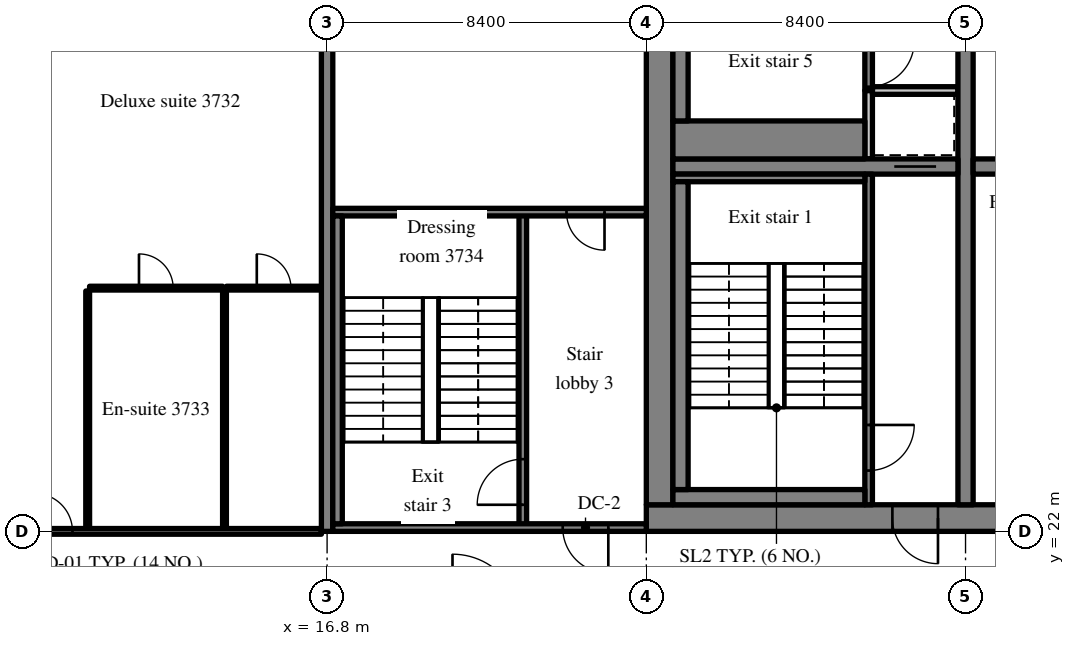
"""IFC4 building model, lengths in metres.
Left out: names, types, materials, properties, quantities, classifications, styles, units other than length and angle.
Written with IfcOpenShell. Run it as: python <this file> out.ifc"""

import sys

from ifc_helpers import new_model, si_unit, direction, frame, frame_2d, origin, place, context, subcontext, project, spatial, rectangle, extrude, source, transform, mapped, element, fill, save


model = new_model("IFC4")
c1 = context("Model", 3, precision=1e-05, world=origin(), true_north=direction((0.0, 1.0)))
c2 = subcontext(c1, "Body", "Model", "MODEL_VIEW")
j1 = project(units=[si_unit("LENGTHUNIT", "METRE"), si_unit("PLANEANGLEUNIT", "RADIAN")], contexts=[c1])
p1 = place(None, origin())
s1 = spatial("IfcSite", under=j1, at=p1, CompositionType="ELEMENT")
p2 = place(p1, origin())
s2 = spatial("IfcBuilding", under=s1, at=p2, CompositionType="ELEMENT")
p3 = place(p2, frame((0.0, 0.0, 155.4)))
s3 = spatial("IfcBuildingStorey", under=s2, at=p3, CompositionType="ELEMENT", Elevation=155.4)
m1 = source(origin(), c2, "Body", "SweptSolid", [
    extrude(rectangle(XDim=50.4, YDim=0.7, at=frame_2d((25.2, 0.0))), origin(), (0.0, 0.0, 1.0), 3.52),
])
p4 = place(p3, frame((25.2, 22.35, 0.0), z_axis=(0.0, 0.0, 1.0), x_axis=(1.0, 0.0, 0.0)))
e1 = element("IfcWall", 1, at=p4, inside=s3, PredefinedType="SHEAR", context=c2, shape_type="MappedRepresentation", body=[
    mapped(m1, transform((0.0, 0.0, 0.0), scale=1.0)),
])
m2 = source(origin(), c2, "Body", "SweptSolid", [
    extrude(rectangle(XDim=1.8, YDim=2.1, at=frame_2d((0.9, 1.05))), frame((0.0, 0.36, 0.0), z_axis=(0.0, -1.0, 0.0), x_axis=(1.0, 0.0, 0.0)), (0.0, 0.0, 1.0), 0.72),
])
p5 = place(p4, frame((15.9, 0.0, 0.0)))
e2 = element("IfcOpeningElement", 2, at=p5, cuts=e1, PredefinedType="OPENING", context=c2, shape_type="MappedRepresentation", body=[
    mapped(m2, transform((0.0, 0.0, 0.0), scale=1.0)),
])
m3 = source(origin(), c2, "Body", "SweptSolid", [
    extrude(rectangle(XDim=0.9, YDim=2.1, at=frame_2d((0.45, 1.05))), frame((0.0, 0.36, 0.0), z_axis=(0.0, -1.0, 0.0), x_axis=(1.0, 0.0, 0.0)), (0.0, 0.0, 1.0), 0.72),
])
p6 = place(p4, frame((21.5, 0.0, 0.0)))
e3 = element("IfcOpeningElement", 3, at=p6, cuts=e1, PredefinedType="OPENING", context=c2, shape_type="MappedRepresentation", body=[
    mapped(m3, transform((0.0, 0.0, 0.0), scale=1.0)),
])
p7 = place(p4, frame((32.7, 0.0, 0.0)))
e4 = element("IfcOpeningElement", 4, at=p7, cuts=e1, PredefinedType="OPENING", context=c2, shape_type="MappedRepresentation", body=[
    mapped(m2, transform((0.0, 0.0, 0.0), scale=1.0)),
])
m4 = source(origin(), c2, "Body", "SweptSolid", [
    extrude(rectangle(XDim=1.2, YDim=2.1, at=frame_2d((0.6, 1.05))), frame((0.0, 0.36, 0.0), z_axis=(0.0, -1.0, 0.0), x_axis=(1.0, 0.0, 0.0)), (0.0, 0.0, 1.0), 0.72),
])
p8 = place(p4, frame((6.475, 0.0, 0.0)))
e5 = element("IfcOpeningElement", 5, at=p8, cuts=e1, PredefinedType="OPENING", context=c2, shape_type="MappedRepresentation", body=[
    mapped(m4, transform((0.0, 0.0, 0.0), scale=1.0)),
])
p9 = place(p4, frame((47.875, 0.0, 0.0)))
e6 = element("IfcOpeningElement", 6, at=p9, cuts=e1, PredefinedType="OPENING", context=c2, shape_type="MappedRepresentation", body=[
    mapped(m4, transform((0.0, 0.0, 0.0), scale=1.0)),
])
m5 = source(origin(), c2, "Body", "SweptSolid", [
    extrude(rectangle(XDim=18.6, YDim=0.7, at=frame_2d((9.3, 0.0))), origin(), (0.0, 0.0, 1.0), 3.52),
])
p10 = place(p3, frame((25.55, 22.7, 0.0), z_axis=(0.0, 0.0, 1.0), x_axis=(0.0, 1.0, 0.0)))
e7 = element("IfcWall", 7, at=p10, inside=s3, PredefinedType="SHEAR", context=c2, shape_type="MappedRepresentation", body=[
    mapped(m5, transform((0.0, 0.0, 0.0), scale=1.0)),
])
m6 = source(origin(), c2, "Body", "SweptSolid", [
    extrude(rectangle(XDim=18.6, YDim=0.4, at=frame_2d((9.3, 0.0))), origin(), (0.0, 0.0, 1.0), 3.52),
])
p11 = place(p3, frame((33.6, 22.7, 0.0), z_axis=(0.0, 0.0, 1.0), x_axis=(0.0, 1.0, 0.0)))
e8 = element("IfcWall", 8, at=p11, inside=s3, PredefinedType="SHEAR", context=c2, shape_type="MappedRepresentation", body=[
    mapped(m6, transform((0.0, 0.0, 0.0), scale=1.0)),
])
m7 = source(origin(), c2, "Body", "SweptSolid", [
    extrude(rectangle(XDim=1.1, YDim=2.1, at=frame_2d((0.55, 1.05))), frame((0.0, 0.21, 0.0), z_axis=(0.0, -1.0, 0.0), x_axis=(1.0, 0.0, 0.0)), (0.0, 0.0, 1.0), 0.42),
])
p12 = place(p11, frame((12.75, 0.0, 0.0)))
e9 = element("IfcOpeningElement", 9, at=p12, cuts=e8, PredefinedType="OPENING", context=c2, shape_type="MappedRepresentation", body=[
    mapped(m7, transform((0.0, 0.0, 0.0), scale=1.0)),
])
m8 = source(origin(), c2, "Body", "SweptSolid", [
    extrude(rectangle(XDim=7.5, YDim=0.4, at=frame_2d((3.75, 0.0))), origin(), (0.0, 0.0, 1.0), 3.52),
])
p13 = place(p3, frame((25.9, 31.6, 0.0), z_axis=(0.0, 0.0, 1.0), x_axis=(1.0, 0.0, 0.0)))
e10 = element("IfcWall", 10, at=p13, inside=s3, PredefinedType="SHEAR", context=c2, shape_type="MappedRepresentation", body=[
    mapped(m8, transform((0.0, 0.0, 0.0), scale=1.0)),
])
p14 = place(p13, frame((5.825, 0.0, 0.0)))
e11 = element("IfcOpeningElement", 11, at=p14, cuts=e10, PredefinedType="OPENING", context=c2, shape_type="MappedRepresentation", body=[
    mapped(m7, transform((0.0, 0.0, 0.0), scale=1.0)),
])
m9 = source(origin(), c2, "Body", "SweptSolid", [
    extrude(rectangle(XDim=16.4, YDim=0.4, at=frame_2d((8.2, 0.0))), origin(), (0.0, 0.0, 1.0), 3.52),
])
p15 = place(p3, frame((33.8, 31.6, 0.0), z_axis=(0.0, 0.0, 1.0), x_axis=(1.0, 0.0, 0.0)))
e12 = element("IfcWall", 12, at=p15, inside=s3, PredefinedType="SHEAR", context=c2, shape_type="MappedRepresentation", body=[
    mapped(m9, transform((0.0, 0.0, 0.0), scale=1.0)),
])
m10 = source(origin(), c2, "Body", "SweptSolid", [
    extrude(rectangle(XDim=1.0, YDim=2.1, at=frame_2d((0.5, 1.05))), frame((0.0, 0.21, 0.0), z_axis=(0.0, -1.0, 0.0), x_axis=(1.0, 0.0, 0.0)), (0.0, 0.0, 1.0), 0.42),
])
p16 = place(p15, frame((14.8, 0.0, 0.0)))
e13 = element("IfcOpeningElement", 13, at=p16, cuts=e12, PredefinedType="OPENING", context=c2, shape_type="MappedRepresentation", body=[
    mapped(m10, transform((0.0, 0.0, 0.0), scale=1.0)),
])
m11 = source(origin(), c2, "Body", "SweptSolid", [
    extrude(rectangle(XDim=20.0, YDim=0.3, at=frame_2d((10.0, 0.0))), origin(), (0.0, 0.0, 1.0), 3.52),
])
p17 = place(p3, frame((16.8, 22.0, 0.0), z_axis=(0.0, 0.0, 1.0), x_axis=(0.0, 1.0, 0.0)))
e14 = element("IfcWall", 14, at=p17, inside=s3, PredefinedType="SHEAR", context=c2, shape_type="MappedRepresentation", body=[
    mapped(m11, transform((0.0, 0.0, 0.0), scale=1.0)),
])
m12 = source(origin(), c2, "Body", "SweptSolid", [
    extrude(rectangle(XDim=8.7, YDim=0.2, at=frame_2d((4.35, 0.0))), origin(), (0.0, 0.0, 1.0), 3.52),
])
p18 = place(p3, frame((31.05, 22.7, 0.0), z_axis=(0.0, 0.0, 1.0), x_axis=(0.0, 1.0, 0.0)))
e15 = element("IfcWall", 15, at=p18, inside=s3, PredefinedType="SOLIDWALL", context=c2, shape_type="MappedRepresentation", body=[
    mapped(m12, transform((0.0, 0.0, 0.0), scale=1.0)),
])
m13 = source(origin(), c2, "Body", "SweptSolid", [
    extrude(rectangle(XDim=1.2, YDim=2.1, at=frame_2d((0.6, 1.05))), frame((0.0, 0.11, 0.0), z_axis=(0.0, -1.0, 0.0), x_axis=(1.0, 0.0, 0.0)), (0.0, 0.0, 1.0), 0.22),
])
p19 = place(p18, frame((0.9, 0.0, 0.0)))
e16 = element("IfcOpeningElement", 16, at=p19, cuts=e15, PredefinedType="OPENING", context=c2, shape_type="MappedRepresentation", body=[
    mapped(m13, transform((0.0, 0.0, 0.0), scale=1.0)),
])
m14 = source(origin(), c2, "Body", "SweptSolid", [
    extrude(rectangle(XDim=1.8, YDim=0.2, at=frame_2d((0.9, 0.0))), origin(), (0.0, 0.0, 1.0), 3.52),
])
p20 = place(p3, frame((31.05, 31.8, 0.0), z_axis=(0.0, 0.0, 1.0), x_axis=(0.0, 1.0, 0.0)))
e17 = element("IfcWall", 17, at=p20, inside=s3, PredefinedType="SOLIDWALL", context=c2, shape_type="MappedRepresentation", body=[
    mapped(m14, transform((0.0, 0.0, 0.0), scale=1.0)),
])
m15 = source(origin(), c2, "Body", "SweptSolid", [
    extrude(rectangle(XDim=2.25, YDim=0.2, at=frame_2d((1.125, 0.0))), origin(), (0.0, 0.0, 1.0), 3.52),
])
p21 = place(p3, frame((31.15, 33.6, 0.0), z_axis=(0.0, 0.0, 1.0), x_axis=(1.0, 0.0, 0.0)))
e18 = element("IfcWall", 18, at=p21, inside=s3, PredefinedType="SOLIDWALL", context=c2, shape_type="MappedRepresentation", body=[
    mapped(m15, transform((0.0, 0.0, 0.0), scale=1.0)),
])
m16 = source(origin(), c2, "Body", "SweptSolid", [
    extrude(rectangle(XDim=7.7, YDim=0.2, at=frame_2d((3.85, 0.0))), origin(), (0.0, 0.0, 1.0), 3.52),
])
p22 = place(p3, frame((31.05, 33.6, 0.0), z_axis=(0.0, 0.0, 1.0), x_axis=(0.0, 1.0, 0.0)))
e19 = element("IfcWall", 19, at=p22, inside=s3, PredefinedType="SOLIDWALL", context=c2, shape_type="MappedRepresentation", body=[
    mapped(m16, transform((0.0, 0.0, 0.0), scale=1.0)),
])
p23 = place(p22, frame((0.1, 0.0, 0.0)))
e20 = element("IfcOpeningElement", 20, at=p23, cuts=e19, PredefinedType="OPENING", context=c2, shape_type="MappedRepresentation", body=[
    mapped(m13, transform((0.0, 0.0, 0.0), scale=1.0)),
])
m17 = source(origin(), c2, "Body", "SweptSolid", [
    extrude(rectangle(XDim=8.3, YDim=0.2, at=frame_2d((4.15, 0.0))), origin(), (0.0, 0.0, 1.0), 3.52),
])
p24 = place(p3, frame((21.95, 22.1, 0.0), z_axis=(0.0, 0.0, 1.0), x_axis=(0.0, 1.0, 0.0)))
e21 = element("IfcWall", 21, at=p24, inside=s3, PredefinedType="SOLIDWALL", context=c2, shape_type="MappedRepresentation", body=[
    mapped(m17, transform((0.0, 0.0, 0.0), scale=1.0)),
])
p25 = place(p24, frame((0.6, 0.0, 0.0)))
e22 = element("IfcOpeningElement", 22, at=p25, cuts=e21, PredefinedType="OPENING", context=c2, shape_type="MappedRepresentation", body=[
    mapped(m13, transform((0.0, 0.0, 0.0), scale=1.0)),
])
m18 = source(origin(), c2, "Body", "SweptSolid", [
    extrude(rectangle(XDim=8.25, YDim=0.2, at=frame_2d((4.125, 0.0))), origin(), (0.0, 0.0, 1.0), 3.52),
])
p26 = place(p3, frame((16.95, 22.1, 0.0), z_axis=(0.0, 0.0, 1.0), x_axis=(1.0, 0.0, 0.0)))
e23 = element("IfcWall", 23, at=p26, inside=s3, PredefinedType="SOLIDWALL", context=c2, shape_type="MappedRepresentation", body=[
    mapped(m18, transform((0.0, 0.0, 0.0), scale=1.0)),
])
p27 = place(p26, frame((6.05, 0.0, 0.0)))
e24 = element("IfcOpeningElement", 24, at=p27, cuts=e23, PredefinedType="OPENING", context=c2, shape_type="MappedRepresentation", body=[
    mapped(m13, transform((0.0, 0.0, 0.0), scale=1.0)),
])
p28 = place(p3, frame((16.95, 30.4, 0.0), z_axis=(0.0, 0.0, 1.0), x_axis=(1.0, 0.0, 0.0)))
e25 = element("IfcWall", 25, at=p28, inside=s3, PredefinedType="SOLIDWALL", context=c2, shape_type="MappedRepresentation", body=[
    mapped(m18, transform((0.0, 0.0, 0.0), scale=1.0)),
])
m19 = source(origin(), c2, "Body", "SweptSolid", [
    extrude(rectangle(XDim=1.0, YDim=2.1, at=frame_2d((0.5, 1.05))), frame((0.0, 0.11, 0.0), z_axis=(0.0, -1.0, 0.0), x_axis=(1.0, 0.0, 0.0)), (0.0, 0.0, 1.0), 0.22),
])
p29 = place(p28, frame((6.15, 0.0, 0.0)))
e26 = element("IfcOpeningElement", 26, at=p29, cuts=e25, PredefinedType="OPENING", context=c2, shape_type="MappedRepresentation", body=[
    mapped(m19, transform((0.0, 0.0, 0.0), scale=1.0)),
])
m20 = source(origin(), c2, "Body", "SweptSolid", [
    extrude(rectangle(XDim=5.05, YDim=0.4, at=frame_2d((2.525, 0.0))), origin(), (0.0, 0.0, 1.0), 3.52),
])
p30 = place(p3, frame((25.9, 22.9, 0.0), z_axis=(0.0, 0.0, 1.0), x_axis=(1.0, 0.0, 0.0)))
e27 = element("IfcWall", 27, at=p30, inside=s3, PredefinedType="SOLIDWALL", context=c2, shape_type="MappedRepresentation", body=[
    mapped(m20, transform((0.0, 0.0, 0.0), scale=1.0)),
])
m21 = source(origin(), c2, "Body", "SweptSolid", [
    extrude(rectangle(XDim=5.05, YDim=0.2, at=frame_2d((2.525, 0.0))), origin(), (0.0, 0.0, 1.0), 3.52),
])
p31 = place(p3, frame((25.9, 31.3, 0.0), z_axis=(0.0, 0.0, 1.0), x_axis=(1.0, 0.0, 0.0)))
e28 = element("IfcWall", 28, at=p31, inside=s3, PredefinedType="SOLIDWALL", context=c2, shape_type="MappedRepresentation", body=[
    mapped(m21, transform((0.0, 0.0, 0.0), scale=1.0)),
])
m22 = source(origin(), c2, "Body", "SweptSolid", [
    extrude(rectangle(XDim=8.1, YDim=0.4, at=frame_2d((4.05, 0.0))), origin(), (0.0, 0.0, 1.0), 3.52),
])
p32 = place(p3, frame((26.1, 23.1, 0.0), z_axis=(0.0, 0.0, 1.0), x_axis=(0.0, 1.0, 0.0)))
e29 = element("IfcWall", 29, at=p32, inside=s3, PredefinedType="SOLIDWALL", context=c2, shape_type="MappedRepresentation", body=[
    mapped(m22, transform((0.0, 0.0, 0.0), scale=1.0)),
])
m23 = source(origin(), c2, "Body", "SweptSolid", [
    extrude(rectangle(XDim=8.1, YDim=0.25, at=frame_2d((4.05, 0.0))), origin(), (0.0, 0.0, 1.0), 3.52),
])
p33 = place(p3, frame((17.075, 22.2, 0.0), z_axis=(0.0, 0.0, 1.0), x_axis=(0.0, 1.0, 0.0)))
e30 = element("IfcWall", 30, at=p33, inside=s3, PredefinedType="SOLIDWALL", context=c2, shape_type="MappedRepresentation", body=[
    mapped(m23, transform((0.0, 0.0, 0.0), scale=1.0)),
])
m24 = source(origin(), c2, "Body", "SweptSolid", [
    extrude(rectangle(XDim=5.05, YDim=1.0, at=frame_2d((2.525, 0.0))), origin(), (0.0, 0.0, 1.0), 3.52),
])
p34 = place(p3, frame((25.9, 32.3, 0.0), z_axis=(0.0, 0.0, 1.0), x_axis=(1.0, 0.0, 0.0)))
e31 = element("IfcWall", 31, at=p34, inside=s3, PredefinedType="SOLIDWALL", context=c2, shape_type="MappedRepresentation", body=[
    mapped(m24, transform((0.0, 0.0, 0.0), scale=1.0)),
])
p35 = place(p3, frame((26.1, 32.8, 0.0), z_axis=(0.0, 0.0, 1.0), x_axis=(0.0, 1.0, 0.0)))
e32 = element("IfcWall", 32, at=p35, inside=s3, PredefinedType="SOLIDWALL", context=c2, shape_type="MappedRepresentation", body=[
    mapped(m22, transform((0.0, 0.0, 0.0), scale=1.0)),
])
m25 = source(origin(), c2, "Body", "SweptSolid", [
    extrude(rectangle(XDim=6.25, YDim=0.1, at=frame_2d((3.125, 0.0))), origin(), (0.0, 0.0, 1.0), 3.52),
])
for number, where, z_axis, x_axis in (
    (33, (10.5, 22.075, 0.0), (0.0, 0.0, 1.0), (0.0, 1.0, 0.0)),
    (34, (14.1, 22.075, 0.0), (0.0, 0.0, 1.0), (0.0, 1.0, 0.0)),
):
    element("IfcWall", number, at=place(p3, frame(where, z_axis=z_axis, x_axis=x_axis)), inside=s3, PredefinedType="PARTITIONING", context=c2, shape_type="MappedRepresentation", body=[
        mapped(m25, transform((0.0, 0.0, 0.0), scale=1.0)),
    ])
m26 = source(origin(), c2, "Body", "SweptSolid", [
    extrude(rectangle(XDim=3.5, YDim=0.1, at=frame_2d((1.75, 0.0))), origin(), (0.0, 0.0, 1.0), 3.52),
])
p36 = place(p3, frame((10.55, 28.4, 0.0), z_axis=(0.0, 0.0, 1.0), x_axis=(1.0, 0.0, 0.0)))
e35 = element("IfcWall", 35, at=p36, inside=s3, PredefinedType="PARTITIONING", context=c2, shape_type="MappedRepresentation", body=[
    mapped(m26, transform((0.0, 0.0, 0.0), scale=1.0)),
])
m27 = source(origin(), c2, "Body", "SweptSolid", [
    extrude(rectangle(XDim=0.9, YDim=2.1, at=frame_2d((0.45, 1.05))), frame((0.0, 0.06, 0.0), z_axis=(0.0, -1.0, 0.0), x_axis=(1.0, 0.0, 0.0)), (0.0, 0.0, 1.0), 0.12),
])
p37 = place(p36, frame((1.3, 0.0, 0.0)))
e36 = element("IfcOpeningElement", 36, at=p37, cuts=e35, PredefinedType="OPENING", context=c2, shape_type="MappedRepresentation", body=[
    mapped(m27, transform((0.0, 0.0, 0.0), scale=1.0)),
])
m28 = source(origin(), c2, "Body", "SweptSolid", [
    extrude(rectangle(XDim=2.5, YDim=0.1, at=frame_2d((1.25, 0.0))), origin(), (0.0, 0.0, 1.0), 3.52),
])
p38 = place(p3, frame((14.15, 28.4, 0.0), z_axis=(0.0, 0.0, 1.0), x_axis=(1.0, 0.0, 0.0)))
e37 = element("IfcWall", 37, at=p38, inside=s3, PredefinedType="PARTITIONING", context=c2, shape_type="MappedRepresentation", body=[
    mapped(m28, transform((0.0, 0.0, 0.0), scale=1.0)),
])
p39 = place(p38, frame((0.8, 0.0, 0.0)))
e38 = element("IfcOpeningElement", 38, at=p39, cuts=e37, PredefinedType="OPENING", context=c2, shape_type="MappedRepresentation", body=[
    mapped(m27, transform((0.0, 0.0, 0.0), scale=1.0)),
])
m29 = source(origin(), c2, "Body", "SweptSolid", [
    extrude(rectangle(XDim=7.95, YDim=0.15, at=frame_2d((3.975, 0.0))), origin(), (0.0, 0.0, 1.0), 2.82),
])
p40 = place(p3, frame((8.7, 22.0, 0.0), z_axis=(0.0, 0.0, 1.0), x_axis=(1.0, 0.0, 0.0)))
e39 = element("IfcWall", 39, at=p40, inside=s3, PredefinedType="PARTITIONING", context=c2, shape_type="MappedRepresentation", body=[
    mapped(m29, transform((0.0, 0.0, 0.0), scale=1.0)),
])
m30 = source(origin(), c2, "Body", "SweptSolid", [
    extrude(rectangle(XDim=1.0, YDim=2.1, at=frame_2d((0.5, 1.05))), frame((0.0, 0.085, 0.0), z_axis=(0.0, -1.0, 0.0), x_axis=(1.0, 0.0, 0.0)), (0.0, 0.0, 1.0), 0.17),
])
p41 = place(p40, frame((0.4, 0.0, 0.0)))
e40 = element("IfcOpeningElement", 40, at=p41, cuts=e39, PredefinedType="OPENING", context=c2, shape_type="MappedRepresentation", body=[
    mapped(m30, transform((0.0, 0.0, 0.0), scale=1.0)),
])
m31 = source(origin(), c2, "Body", "SweptSolid", [
    extrude(rectangle(XDim=1.2, YDim=2.1, at=frame_2d((0.6, 1.05))), frame((0.0, 0.025, 0.0), z_axis=(0.0, -1.0, 0.0), x_axis=(1.0, 0.0, 0.0)), (0.0, 0.0, 1.0), 0.05),
])
p42 = place(p19, origin())
e41 = element("IfcDoor", 41, at=p42, inside=s3, OperationType="SINGLE_SWING_RIGHT", PredefinedType="DOOR", context=c2, shape_type="MappedRepresentation", body=[
    mapped(m31, transform((0.0, 0.0, 0.0), scale=1.0)),
])
fill(e16, e41)
m32 = source(origin(), c2, "Body", "SweptSolid", [
    extrude(rectangle(XDim=1.2, YDim=2.1, at=frame_2d((0.6, 1.05))), frame((0.0, 0.275, 0.0), z_axis=(0.0, -1.0, 0.0), x_axis=(1.0, 0.0, 0.0)), (0.0, 0.0, 1.0), 0.05),
])
p43 = place(p8, origin())
e42 = element("IfcDoor", 42, at=p43, inside=s3, OperationType="SINGLE_SWING_RIGHT", PredefinedType="DOOR", context=c2, shape_type="MappedRepresentation", body=[
    mapped(m32, transform((0.0, 0.0, 0.0), scale=1.0)),
])
fill(e5, e42)
m33 = source(origin(), c2, "Body", "SweptSolid", [
    extrude(rectangle(XDim=1.1, YDim=2.1, at=frame_2d((0.55, 1.05))), frame((0.0, 0.025, 0.0), z_axis=(0.0, -1.0, 0.0), x_axis=(1.0, 0.0, 0.0)), (0.0, 0.0, 1.0), 0.05),
])
p44 = place(p14, origin())
e43 = element("IfcDoor", 43, at=p44, inside=s3, OperationType="SLIDING_TO_RIGHT", PredefinedType="DOOR", context=c2, shape_type="MappedRepresentation", body=[
    mapped(m33, transform((0.0, 0.0, 0.0), scale=1.0)),
])
fill(e11, e43)
p45 = place(p23, origin())
e44 = element("IfcDoor", 44, at=p45, inside=s3, OperationType="SINGLE_SWING_RIGHT", PredefinedType="DOOR", context=c2, shape_type="MappedRepresentation", body=[
    mapped(m31, transform((0.0, 0.0, 0.0), scale=1.0)),
])
fill(e20, e44)
p46 = place(p25, origin())
e45 = element("IfcDoor", 45, at=p46, inside=s3, OperationType="SINGLE_SWING_LEFT", PredefinedType="DOOR", context=c2, shape_type="MappedRepresentation", body=[
    mapped(m31, transform((0.0, 0.0, 0.0), scale=1.0)),
])
fill(e22, e45)
p47 = place(p27, origin())
e46 = element("IfcDoor", 46, at=p47, inside=s3, OperationType="SINGLE_SWING_RIGHT", PredefinedType="DOOR", context=c2, shape_type="MappedRepresentation", body=[
    mapped(m31, transform((0.0, 0.0, 0.0), scale=1.0)),
])
fill(e24, e46)
m34 = source(origin(), c2, "Body", "SweptSolid", [
    extrude(rectangle(XDim=1.0, YDim=2.1, at=frame_2d((0.5, 1.05))), frame((0.0, 0.025, 0.0), z_axis=(0.0, -1.0, 0.0), x_axis=(1.0, 0.0, 0.0)), (0.0, 0.0, 1.0), 0.05),
])
p48 = place(p29, origin())
e47 = element("IfcDoor", 47, at=p48, inside=s3, OperationType="SINGLE_SWING_RIGHT", PredefinedType="DOOR", context=c2, shape_type="MappedRepresentation", body=[
    mapped(m34, transform((0.0, 0.0, 0.0), scale=1.0)),
])
fill(e26, e47)
m35 = source(origin(), c2, "Body", "SweptSolid", [
    extrude(rectangle(XDim=0.9, YDim=2.1, at=frame_2d((0.45, 1.05))), frame((0.0, 0.025, 0.0), z_axis=(0.0, -1.0, 0.0), x_axis=(1.0, 0.0, 0.0)), (0.0, 0.0, 1.0), 0.05),
])
p49 = place(p37, origin())
e48 = element("IfcDoor", 48, at=p49, inside=s3, OperationType="SINGLE_SWING_LEFT", PredefinedType="DOOR", context=c2, shape_type="MappedRepresentation", body=[
    mapped(m35, transform((0.0, 0.0, 0.0), scale=1.0)),
])
fill(e36, e48)
p50 = place(p39, origin())
e49 = element("IfcDoor", 49, at=p50, inside=s3, OperationType="SINGLE_SWING_LEFT", PredefinedType="DOOR", context=c2, shape_type="MappedRepresentation", body=[
    mapped(m35, transform((0.0, 0.0, 0.0), scale=1.0)),
])
fill(e38, e49)
p51 = place(p41, origin())
e50 = element("IfcDoor", 50, at=p51, inside=s3, OperationType="SINGLE_SWING_LEFT", PredefinedType="DOOR", context=c2, shape_type="MappedRepresentation", body=[
    mapped(m34, transform((0.0, 0.0, 0.0), scale=1.0)),
])
fill(e40, e50)
save(model, sys.argv[1])
